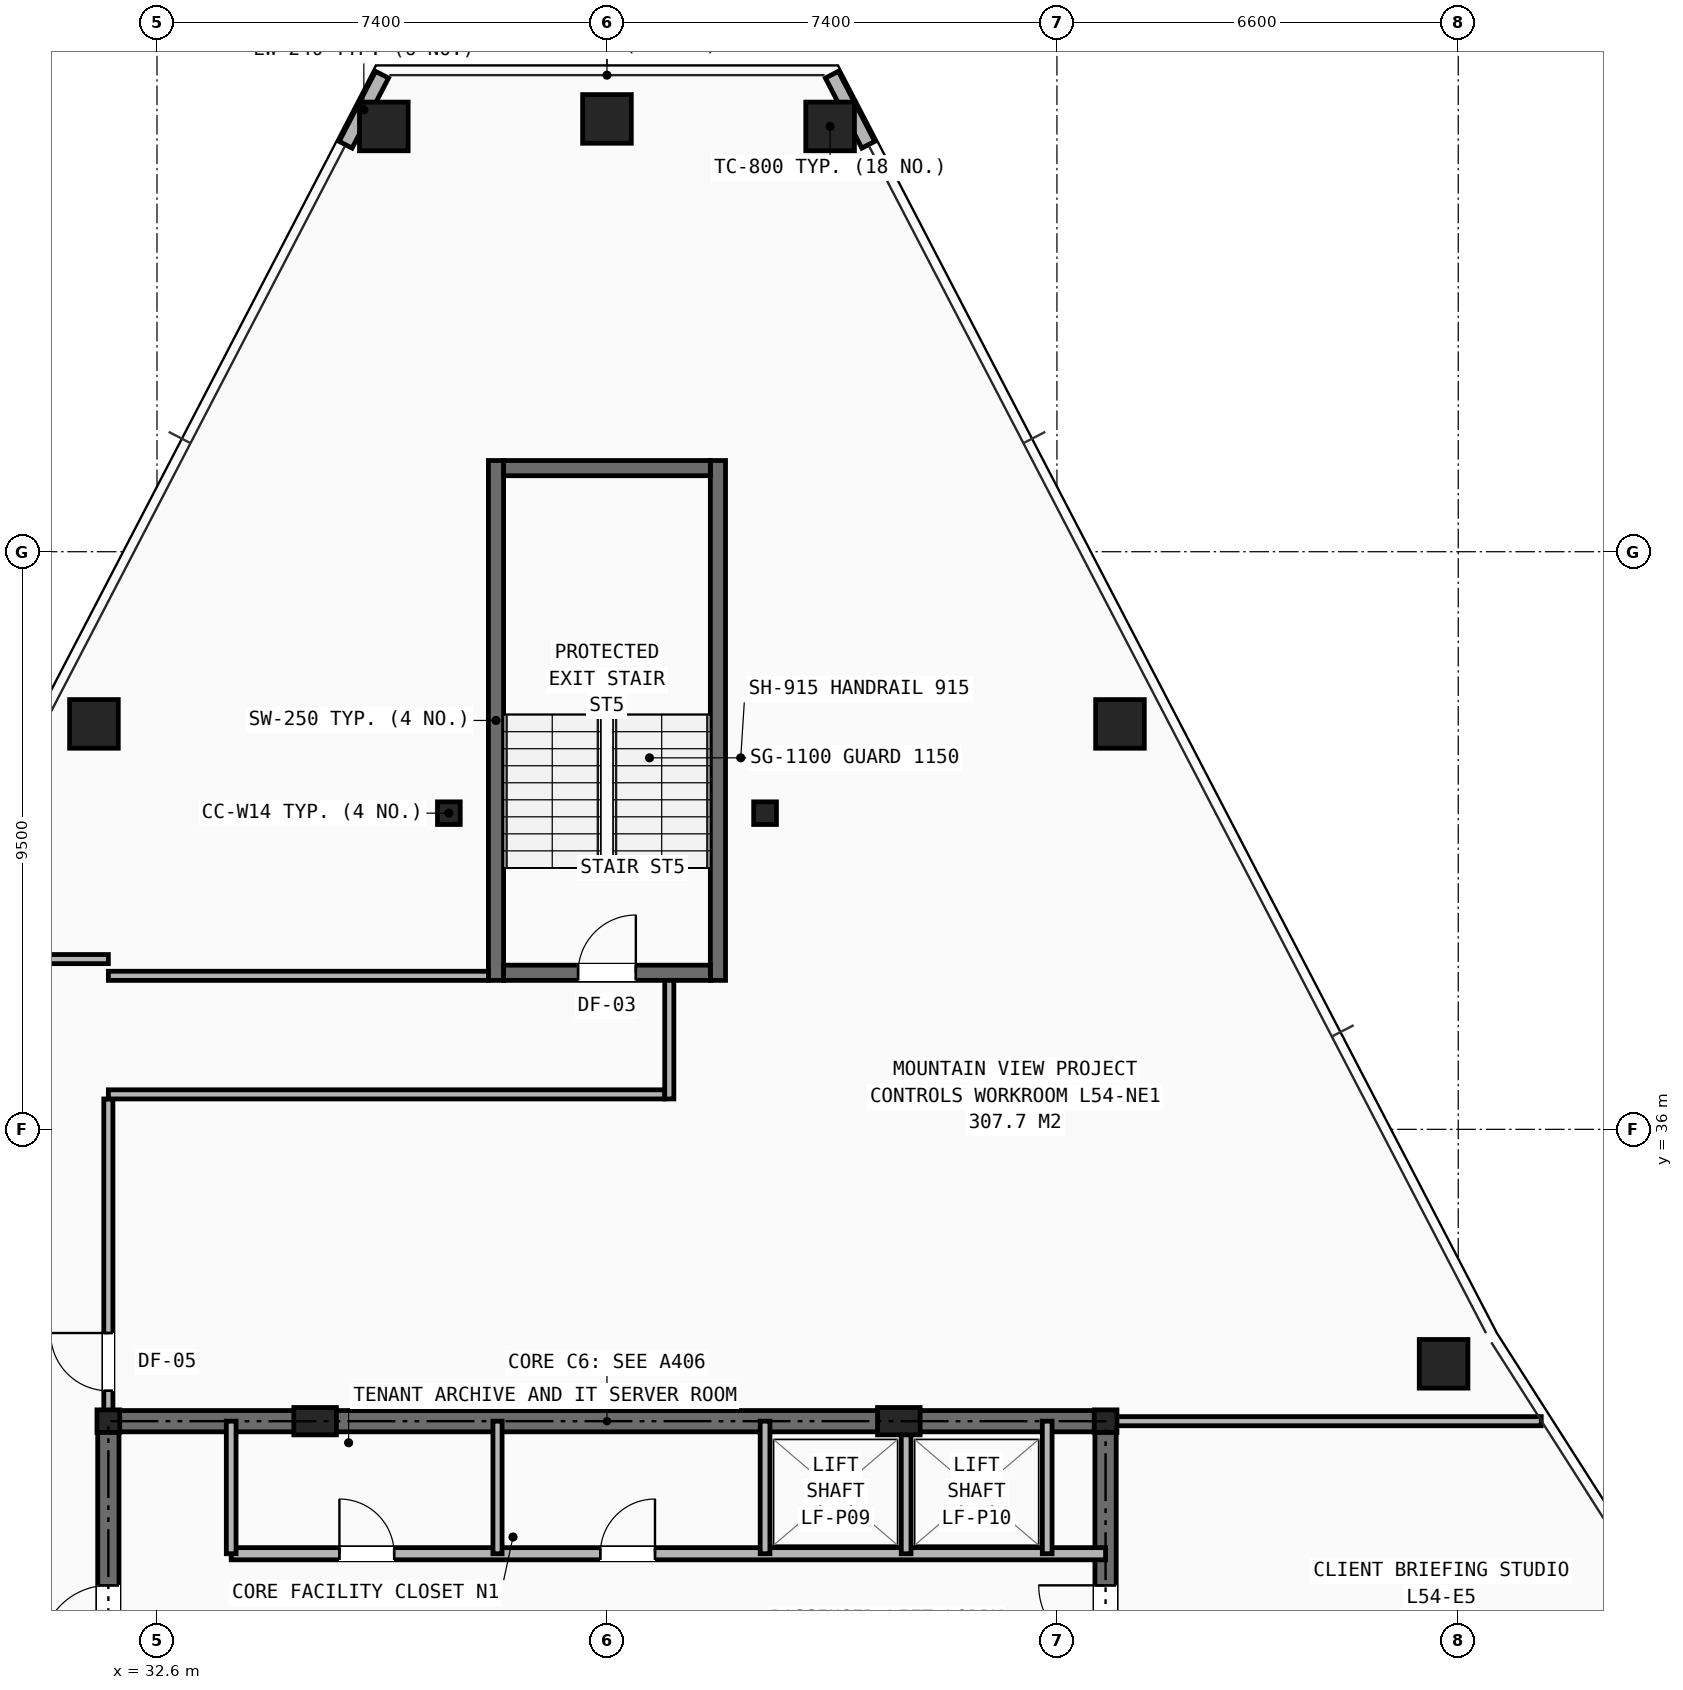
"""IFC4 building model, lengths in metres.
Left out: names, types, materials, properties, quantities, classifications, styles, units other than length and angle.
Written with IfcOpenShell. Run it as: python <this file> out.ifc"""

import sys

from ifc_helpers import new_model, si_unit, direction, frame, frame_2d, origin, origin_2d, place, context, subcontext, project, spatial, rectangle, hollow_rectangle, i_section, extrude, element, fill, save


model = new_model("IFC4")
c1 = context("Model", 3, precision=1e-05, world=origin(), true_north=direction((0.0, 1.0)))
c2 = subcontext(c1, "Body", "Model", "MODEL_VIEW")
j1 = project(units=[si_unit("LENGTHUNIT", "METRE"), si_unit("PLANEANGLEUNIT", "RADIAN")], contexts=[c1])
p1 = place(None, origin())
s1 = spatial("IfcSite", under=j1, at=p1, CompositionType="ELEMENT")
p2 = place(p1, origin())
s2 = spatial("IfcBuilding", under=s1, at=p2, CompositionType="ELEMENT")
p3 = place(p2, frame((0.0, 0.0, 189.6)))
s3 = spatial("IfcBuildingStorey", under=s2, at=p3, CompositionType="ELEMENT", Elevation=189.6)
for number, where, z_axis, x_axis in (
    (1, (31.8, 31.2, 0.0), (0.0, 0.0, 1.0), (1.0, 0.0, 0.0)),
    (2, (48.2, 31.2, 0.0), (0.0, 0.0, 1.0), (1.0, 0.0, 0.0)),
    (3, (37.4, 41.2, 0.0), (0.0, 0.0, 1.0), (1.0, 0.0, 0.0)),
    (4, (42.6, 41.2, 0.0), (0.0, 0.0, 1.0), (1.0, 0.0, 0.0)),
):
    element("IfcColumn", number, at=place(p3, frame(where, z_axis=z_axis, x_axis=x_axis)), inside=s3, PredefinedType="COLUMN", context=c2, shape_type="SweptSolid", body=[
        extrude(i_section(OverallWidth=0.374, OverallDepth=0.372, WebThickness=0.016, FlangeThickness=0.026, at=origin_2d()), origin(), (0.0, 0.0, 1.0), 3.45),
    ])
for number, where, z_axis, x_axis in (
    (5, (35.2, 31.2, 0.0), (0.0, 0.0, 1.0), (1.0, 0.0, 0.0)),
    (6, (44.8, 31.2, 0.0), (0.0, 0.0, 1.0), (1.0, 0.0, 0.0)),
):
    element("IfcColumn", number, at=place(p3, frame(where, z_axis=z_axis, x_axis=x_axis)), inside=s3, PredefinedType="PILASTER", context=c2, shape_type="SweptSolid", body=[
        extrude(rectangle(XDim=0.7, YDim=0.45, at=origin_2d()), origin(), (0.0, 0.0, 1.0), 3.45),
    ])
for number, where, z_axis, x_axis in (
    (7, (43.67, 52.495, 0.0), (0.0, 0.0, 1.0), (1.0, 0.0, 0.0)),
    (8, (40.0, 52.618, 0.0), (0.0, 0.0, 1.0), (1.0, 0.0, 0.0)),
    (9, (36.33, 52.495, 0.0), (0.0, 0.0, 1.0), (1.0, 0.0, 0.0)),
    (10, (31.563, 42.668, 0.0), (0.0, 0.0, 1.0), (1.0, 0.0, 0.0)),
    (11, (53.759, 32.144, 0.0), (0.0, 0.0, 1.0), (1.0, 0.0, 0.0)),
    (12, (48.437, 42.668, 0.0), (0.0, 0.0, 1.0), (1.0, 0.0, 0.0)),
):
    element("IfcColumn", number, at=place(p3, frame(where, z_axis=z_axis, x_axis=x_axis)), inside=s3, PredefinedType="COLUMN", context=c2, shape_type="SweptSolid", body=[
        extrude(hollow_rectangle(XDim=0.8, YDim=0.8, WallThickness=0.055, at=origin_2d()), origin(), (0.0, 0.0, 1.0), 3.45),
    ])
for number, where, z_axis, x_axis in (
    (13, (36.301, 53.345, 0.0), (0.0, 0.0, 1.0), (-0.461, -0.887, 0.0)),
    (14, (44.298, 52.193, 0.0), (0.0, 0.0, 1.0), (-0.461, 0.887, 0.0)),
):
    element("IfcWall", number, at=place(p3, frame(where, z_axis=z_axis, x_axis=x_axis)), inside=s3, PredefinedType="SHEAR", context=c2, shape_type="SweptSolid", body=[
        extrude(rectangle(XDim=1.299, YDim=0.24, at=frame_2d((0.649, 0.0))), origin(), (0.0, 0.0, 1.0), 2.583),
    ])
p4 = place(p3, frame((31.8, 31.2, 0.0), z_axis=(0.0, 0.0, 1.0), x_axis=(1.0, 0.0, 0.0)))
e15 = element("IfcWall", 15, at=p4, inside=s3, PredefinedType="SHEAR", context=c2, shape_type="SweptSolid", body=[
    extrude(rectangle(XDim=16.4, YDim=0.35, at=frame_2d((8.2, 0.0))), origin(), (0.0, 0.0, 1.0), 3.21),
])
p5 = place(p3, frame((31.8, 16.4, 0.0), z_axis=(0.0, 0.0, 1.0), x_axis=(0.0, 1.0, 0.0)))
e16 = element("IfcWall", 16, at=p5, inside=s3, PredefinedType="SHEAR", context=c2, shape_type="SweptSolid", body=[
    extrude(rectangle(XDim=14.8, YDim=0.35, at=frame_2d((7.4, 0.0))), origin(), (0.0, 0.0, 1.0), 3.21),
])
p6 = place(p5, frame((11.0, 0.0, 0.0)))
e17 = element("IfcOpeningElement", 17, at=p6, cuts=e16, PredefinedType="OPENING", context=c2, shape_type="SweptSolid", body=[
    extrude(rectangle(XDim=1.1, YDim=2.15, at=frame_2d((0.55, 1.075))), frame((0.0, 0.185, 0.0), z_axis=(0.0, -1.0, 0.0), x_axis=(1.0, 0.0, 0.0)), (0.0, 0.0, 1.0), 0.37),
])
p7 = place(p3, frame((48.2, 16.4, 0.0), z_axis=(0.0, 0.0, 1.0), x_axis=(0.0, 1.0, 0.0)))
e18 = element("IfcWall", 18, at=p7, inside=s3, PredefinedType="SHEAR", context=c2, shape_type="SweptSolid", body=[
    extrude(rectangle(XDim=14.8, YDim=0.35, at=frame_2d((7.4, 0.0))), origin(), (0.0, 0.0, 1.0), 3.21),
])
p8 = place(p7, frame((11.0, 0.0, 0.0)))
e19 = element("IfcOpeningElement", 19, at=p8, cuts=e18, PredefinedType="OPENING", context=c2, shape_type="SweptSolid", body=[
    extrude(rectangle(XDim=1.1, YDim=2.15, at=frame_2d((0.55, 1.075))), frame((0.0, 0.185, 0.0), z_axis=(0.0, -1.0, 0.0), x_axis=(1.0, 0.0, 0.0)), (0.0, 0.0, 1.0), 0.37),
])
p9 = place(p3, frame((33.82, 29.02, 0.0), z_axis=(0.0, 0.0, 1.0), x_axis=(1.0, 0.0, 0.0)))
e20 = element("IfcWall", 20, at=p9, inside=s3, PredefinedType="SOLIDWALL", context=c2, shape_type="SweptSolid", body=[
    extrude(rectangle(XDim=14.38, YDim=0.2, at=frame_2d((7.19, 0.0))), origin(), (0.0, 0.0, 1.0), 2.665),
])
p10 = place(p9, frame((1.78, 0.0, 0.0)))
e21 = element("IfcOpeningElement", 21, at=p10, cuts=e20, PredefinedType="OPENING", context=c2, shape_type="SweptSolid", body=[
    extrude(rectangle(XDim=0.9, YDim=2.1, at=frame_2d((0.45, 1.05))), frame((0.0, 0.11, 0.0), z_axis=(0.0, -1.0, 0.0), x_axis=(1.0, 0.0, 0.0)), (0.0, 0.0, 1.0), 0.22),
])
p11 = place(p9, frame((6.07, 0.0, 0.0)))
e22 = element("IfcOpeningElement", 22, at=p11, cuts=e20, PredefinedType="OPENING", context=c2, shape_type="SweptSolid", body=[
    extrude(rectangle(XDim=0.9, YDim=2.1, at=frame_2d((0.45, 1.05))), frame((0.0, 0.11, 0.0), z_axis=(0.0, -1.0, 0.0), x_axis=(1.0, 0.0, 0.0)), (0.0, 0.0, 1.0), 0.22),
])
p12 = place(p3, frame((33.82, 29.02, 0.0), z_axis=(0.0, 0.0, 1.0), x_axis=(0.0, 1.0, 0.0)))
e23 = element("IfcWall", 23, at=p12, inside=s3, PredefinedType="SOLIDWALL", context=c2, shape_type="SweptSolid", body=[
    extrude(rectangle(XDim=2.18, YDim=0.16, at=frame_2d((1.09, 0.0))), origin(), (0.0, 0.0, 1.0), 2.665),
])
p13 = place(p3, frame((38.2, 29.02, 0.0), z_axis=(0.0, 0.0, 1.0), x_axis=(0.0, 1.0, 0.0)))
e24 = element("IfcWall", 24, at=p13, inside=s3, PredefinedType="PARTITIONING", context=c2, shape_type="SweptSolid", body=[
    extrude(rectangle(XDim=2.18, YDim=0.15, at=frame_2d((1.09, 0.0))), origin(), (0.0, 0.0, 1.0), 2.665),
])
for number, where, z_axis, x_axis in (
    (25, (42.6, 29.02, 0.0), (0.0, 0.0, 1.0), (0.0, 1.0, 0.0)),
    (26, (44.92, 29.02, 0.0), (0.0, 0.0, 1.0), (0.0, 1.0, 0.0)),
    (27, (47.24, 29.02, 0.0), (0.0, 0.0, 1.0), (0.0, 1.0, 0.0)),
):
    element("IfcWall", number, at=place(p3, frame(where, z_axis=z_axis, x_axis=x_axis)), inside=s3, PredefinedType="SOLIDWALL", context=c2, shape_type="SweptSolid", body=[
        extrude(rectangle(XDim=2.18, YDim=0.16, at=frame_2d((1.09, 0.0))), origin(), (0.0, 0.0, 1.0), 2.665),
    ])
p14 = place(p3, frame((31.8, 31.2, 0.0), z_axis=(0.0, 0.0, 1.0), x_axis=(0.0, 1.0, 0.0)))
e28 = element("IfcWall", 28, at=p14, inside=s3, PredefinedType="PARTITIONING", context=c2, shape_type="SweptSolid", body=[
    extrude(rectangle(XDim=5.3, YDim=0.15, at=frame_2d((2.65, 0.0))), origin(), (0.0, 0.0, 1.0), 2.225),
])
p15 = place(p14, frame((0.5, 0.0, 0.0)))
e29 = element("IfcOpeningElement", 29, at=p15, cuts=e28, PredefinedType="OPENING", context=c2, shape_type="SweptSolid", body=[
    extrude(rectangle(XDim=0.95, YDim=2.1, at=frame_2d((0.475, 1.05))), frame((0.0, 0.085, 0.0), z_axis=(0.0, -1.0, 0.0), x_axis=(1.0, 0.0, 0.0)), (0.0, 0.0, 1.0), 0.17),
])
p16 = place(p3, frame((29.6, 38.8, 0.0), z_axis=(0.0, 0.0, 1.0), x_axis=(1.0, 0.0, 0.0)))
e30 = element("IfcWall", 30, at=p16, inside=s3, PredefinedType="PARTITIONING", context=c2, shape_type="SweptSolid", body=[
    extrude(rectangle(XDim=2.2, YDim=0.15, at=frame_2d((1.1, 0.0))), origin(), (0.0, 0.0, 1.0), 2.589),
])
p17 = place(p3, frame((48.2, 31.2, 0.0), z_axis=(0.0, 0.0, 1.0), x_axis=(1.0, 0.0, 0.0)))
e31 = element("IfcWall", 31, at=p17, inside=s3, PredefinedType="PARTITIONING", context=c2, shape_type="SweptSolid", body=[
    extrude(rectangle(XDim=7.165, YDim=0.15, at=frame_2d((3.582, 0.0))), origin(), (0.0, 0.0, 1.0), 2.225),
])
for number, where, z_axis, x_axis in (
    (32, (38.175, 38.45, 0.0), (0.0, 0.0, 1.0), (0.0, 1.0, 0.0)),
    (33, (41.825, 38.45, 0.0), (0.0, 0.0, 1.0), (0.0, 1.0, 0.0)),
):
    element("IfcWall", number, at=place(p3, frame(where, z_axis=z_axis, x_axis=x_axis)), inside=s3, PredefinedType="SHEAR", context=c2, shape_type="SweptSolid", body=[
        extrude(rectangle(XDim=8.55, YDim=0.25, at=frame_2d((4.275, 0.0))), origin(), (0.0, 0.0, 1.0), 3.21),
    ])
p18 = place(p3, frame((38.3, 38.575, 0.0), z_axis=(0.0, 0.0, 1.0), x_axis=(1.0, 0.0, 0.0)))
e34 = element("IfcWall", 34, at=p18, inside=s3, PredefinedType="SHEAR", context=c2, shape_type="SweptSolid", body=[
    extrude(rectangle(XDim=3.4, YDim=0.25, at=frame_2d((1.7, 0.0))), origin(), (0.0, 0.0, 1.0), 3.21),
])
p19 = place(p18, frame((1.225, 0.0, 0.0)))
e35 = element("IfcOpeningElement", 35, at=p19, cuts=e34, PredefinedType="OPENING", context=c2, shape_type="SweptSolid", body=[
    extrude(rectangle(XDim=0.95, YDim=2.1, at=frame_2d((0.475, 1.05))), frame((0.0, 0.135, 0.0), z_axis=(0.0, -1.0, 0.0), x_axis=(1.0, 0.0, 0.0)), (0.0, 0.0, 1.0), 0.27),
])
p20 = place(p3, frame((38.3, 46.875, 0.0), z_axis=(0.0, 0.0, 1.0), x_axis=(1.0, 0.0, 0.0)))
e36 = element("IfcWall", 36, at=p20, inside=s3, PredefinedType="SHEAR", context=c2, shape_type="SweptSolid", body=[
    extrude(rectangle(XDim=3.4, YDim=0.25, at=frame_2d((1.7, 0.0))), origin(), (0.0, 0.0, 1.0), 3.21),
])
p21 = place(p3, frame((31.8, 36.575, 0.0), z_axis=(0.0, 0.0, 1.0), x_axis=(1.0, 0.0, 0.0)))
e37 = element("IfcWall", 37, at=p21, inside=s3, PredefinedType="PARTITIONING", context=c2, shape_type="SweptSolid", body=[
    extrude(rectangle(XDim=9.15, YDim=0.15, at=frame_2d((4.575, 0.0))), origin(), (0.0, 0.0, 1.0), 3.21),
])
p22 = place(p3, frame((31.8, 38.525, 0.0), z_axis=(0.0, 0.0, 1.0), x_axis=(1.0, 0.0, 0.0)))
e38 = element("IfcWall", 38, at=p22, inside=s3, PredefinedType="PARTITIONING", context=c2, shape_type="SweptSolid", body=[
    extrude(rectangle(XDim=6.25, YDim=0.15, at=frame_2d((3.125, 0.0))), origin(), (0.0, 0.0, 1.0), 2.793),
])
p23 = place(p3, frame((41.025, 36.5, 0.0), z_axis=(0.0, 0.0, 1.0), x_axis=(0.0, 1.0, 0.0)))
e39 = element("IfcWall", 39, at=p23, inside=s3, PredefinedType="PARTITIONING", context=c2, shape_type="SweptSolid", body=[
    extrude(rectangle(XDim=1.95, YDim=0.15, at=frame_2d((0.975, 0.0))), origin(), (0.0, 0.0, 1.0), 3.21),
])
p24 = place(p6, origin())
e40 = element("IfcDoor", 40, at=p24, inside=s3, OperationType="SINGLE_SWING_LEFT", PredefinedType="DOOR", context=c2, shape_type="SweptSolid", body=[
    extrude(rectangle(XDim=1.1, YDim=2.15, at=frame_2d((0.55, 1.075))), frame((0.0, 0.025, 0.0), z_axis=(0.0, -1.0, 0.0), x_axis=(1.0, 0.0, 0.0)), (0.0, 0.0, 1.0), 0.05),
])
fill(e17, e40)
p25 = place(p8, origin())
e41 = element("IfcDoor", 41, at=p25, inside=s3, OperationType="SINGLE_SWING_RIGHT", PredefinedType="DOOR", context=c2, shape_type="SweptSolid", body=[
    extrude(rectangle(XDim=1.1, YDim=2.15, at=frame_2d((0.55, 1.075))), frame((0.0, 0.025, 0.0), z_axis=(0.0, -1.0, 0.0), x_axis=(1.0, 0.0, 0.0)), (0.0, 0.0, 1.0), 0.05),
])
fill(e19, e41)
p26 = place(p10, origin())
e42 = element("IfcDoor", 42, at=p26, inside=s3, OperationType="SINGLE_SWING_LEFT", PredefinedType="DOOR", context=c2, shape_type="SweptSolid", body=[
    extrude(rectangle(XDim=0.9, YDim=2.1, at=frame_2d((0.45, 1.05))), frame((0.0, 0.025, 0.0), z_axis=(0.0, -1.0, 0.0), x_axis=(1.0, 0.0, 0.0)), (0.0, 0.0, 1.0), 0.05),
])
fill(e21, e42)
p27 = place(p11, origin())
e43 = element("IfcDoor", 43, at=p27, inside=s3, OperationType="SINGLE_SWING_RIGHT", PredefinedType="DOOR", context=c2, shape_type="SweptSolid", body=[
    extrude(rectangle(XDim=0.9, YDim=2.1, at=frame_2d((0.45, 1.05))), frame((0.0, 0.025, 0.0), z_axis=(0.0, -1.0, 0.0), x_axis=(1.0, 0.0, 0.0)), (0.0, 0.0, 1.0), 0.05),
])
fill(e22, e43)
p28 = place(p15, origin())
e44 = element("IfcDoor", 44, at=p28, inside=s3, OperationType="SINGLE_SWING_RIGHT", PredefinedType="DOOR", context=c2, shape_type="SweptSolid", body=[
    extrude(rectangle(XDim=0.95, YDim=2.1, at=frame_2d((0.475, 1.05))), frame((0.0, 0.025, 0.0), z_axis=(0.0, -1.0, 0.0), x_axis=(1.0, 0.0, 0.0)), (0.0, 0.0, 1.0), 0.05),
])
fill(e29, e44)
p29 = place(p19, origin())
e45 = element("IfcDoor", 45, at=p29, inside=s3, OperationType="SINGLE_SWING_RIGHT", PredefinedType="DOOR", context=c2, shape_type="SweptSolid", body=[
    extrude(rectangle(XDim=0.95, YDim=2.1, at=frame_2d((0.475, 1.05))), frame((0.0, 0.025, 0.0), z_axis=(0.0, -1.0, 0.0), x_axis=(1.0, 0.0, 0.0)), (0.0, 0.0, 1.0), 0.05),
])
fill(e35, e45)
save(model, sys.argv[1])
